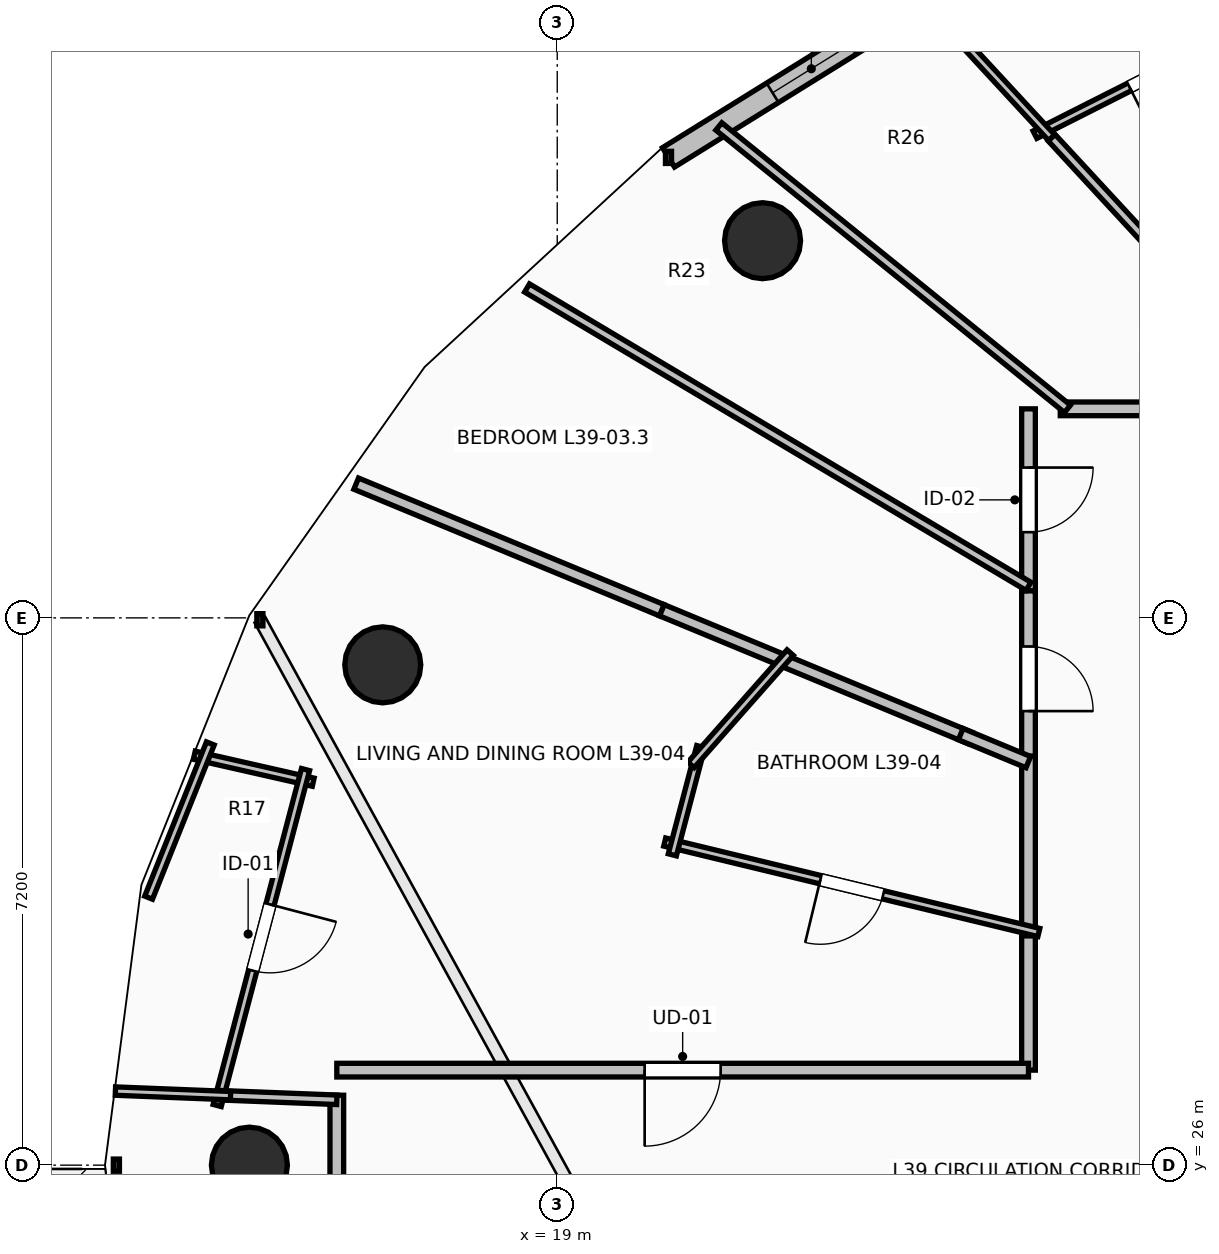
"""IFC4 building model, lengths in metres.
Left out: names, types, materials, properties, quantities, classifications, styles, units other than length and angle.
Written with IfcOpenShell. Run it as: python <this file> out.ifc"""

import sys

from ifc_helpers import new_model, si_unit, direction, frame, frame_2d, origin, origin_2d, place, context, subcontext, project, spatial, rectangle, circle, extrude, element, fill, save


model = new_model("IFC4")
c1 = context("Model", 3, precision=1e-05, world=origin(), true_north=direction((0.0, 1.0)))
c2 = subcontext(c1, "Body", "Model", "MODEL_VIEW")
j1 = project(units=[si_unit("LENGTHUNIT", "METRE"), si_unit("PLANEANGLEUNIT", "RADIAN")], contexts=[c1])
p1 = place(None, origin())
s1 = spatial("IfcSite", under=j1, at=p1, CompositionType="ELEMENT")
p2 = place(p1, origin())
s2 = spatial("IfcBuilding", under=s1, at=p2, CompositionType="ELEMENT")
p3 = place(p2, frame((0.0, 0.0, 146.6)))
s3 = spatial("IfcBuildingStorey", under=s2, at=p3, CompositionType="ELEMENT", Elevation=146.6)
for number, where, z_axis, x_axis in (
    (1, (21.701, 38.162, 0.0), (0.0, 0.0, 1.0), (-0.707, 0.707, 0.0)),
    (2, (16.705, 32.582, 0.0), (0.0, 0.0, 1.0), (-0.924, 0.383, 0.0)),
    (3, (14.95, 26.0, 0.0), (0.0, 0.0, 1.0), (-1.0, 0.0, 0.0)),
):
    element("IfcColumn", number, at=place(p3, frame(where, z_axis=z_axis, x_axis=x_axis)), inside=s3, PredefinedType="COLUMN", context=c2, shape_type="SweptSolid", body=[
        extrude(circle(Radius=0.5, at=origin_2d()), origin(), (0.0, 0.0, 1.0), 3.5),
    ])
p4 = place(p3, frame((24.222, 41.59, 0.0), z_axis=(0.0, 0.0, 1.0), x_axis=(-0.849721181976, -0.527232313977, 0.0)))
e4 = element("IfcWall", 4, at=p4, inside=s3, PredefinedType="STANDARD", context=c2, shape_type="SweptSolid", body=[
    extrude(rectangle(XDim=4.423, YDim=0.3, at=frame_2d((2.211, 0.0))), origin(), (0.0, 0.0, 1.0), 3.24),
])
p5 = place(p4, frame((1.611, 0.0, 0.85)))
e5 = element("IfcOpeningElement", 5, at=p5, cuts=e4, PredefinedType="OPENING", context=c2, shape_type="SweptSolid", body=[
    extrude(rectangle(XDim=1.2, YDim=1.95, at=frame_2d((0.6, 0.975))), frame((0.0, 0.165, 0.0), z_axis=(0.0, -1.0, 0.0), x_axis=(1.0, 0.0, 0.0)), (0.0, 0.0, 1.0), 0.33),
])
p6 = place(p3, frame((28.72, 35.95, 0.0), z_axis=(0.0, 0.0, 1.0), x_axis=(-1.0, 0.0, 0.0)))
e6 = element("IfcWall", 6, at=p6, inside=s3, PredefinedType="PARTITIONING", context=c2, shape_type="SweptSolid", body=[
    extrude(rectangle(XDim=3.102, YDim=0.18, at=frame_2d((1.551, 0.0))), origin(), (0.0, 0.0, 1.0), 2.432),
])
p7 = place(p3, frame((25.2, 35.95, 0.0), z_axis=(0.0, 0.0, 1.0), x_axis=(0.0, -1.0, 0.0)))
e7 = element("IfcWall", 7, at=p7, inside=s3, PredefinedType="PARTITIONING", context=c2, shape_type="SweptSolid", body=[
    extrude(rectangle(XDim=2.395, YDim=0.18, at=frame_2d((1.198, 0.0))), origin(), (0.0, 0.0, 1.0), 2.432),
])
p8 = place(p7, frame((0.772, 0.0, 0.0)))
e8 = element("IfcOpeningElement", 8, at=p8, cuts=e7, PredefinedType="OPENING", context=c2, shape_type="SweptSolid", body=[
    extrude(rectangle(XDim=0.85, YDim=2.1, at=frame_2d((0.425, 1.05))), frame((0.0, 0.105, 0.0), z_axis=(0.0, -1.0, 0.0), x_axis=(1.0, 0.0, 0.0)), (0.0, 0.0, 1.0), 0.21),
])
p9 = place(p3, frame((25.2, 33.555, 0.0), z_axis=(0.0, 0.0, 1.0), x_axis=(0.0, -1.0, 0.0)))
e9 = element("IfcWall", 9, at=p9, inside=s3, PredefinedType="PARTITIONING", context=c2, shape_type="SweptSolid", body=[
    extrude(rectangle(XDim=2.313, YDim=0.18, at=frame_2d((1.156, 0.0))), origin(), (0.0, 0.0, 1.0), 3.24),
])
p10 = place(p9, frame((0.731, 0.0, 0.0)))
e10 = element("IfcOpeningElement", 10, at=p10, cuts=e9, PredefinedType="OPENING", context=c2, shape_type="SweptSolid", body=[
    extrude(rectangle(XDim=0.85, YDim=2.1, at=frame_2d((0.425, 1.05))), frame((0.0, 0.105, 0.0), z_axis=(0.0, -1.0, 0.0), x_axis=(1.0, 0.0, 0.0)), (0.0, 0.0, 1.0), 0.21),
])
p11 = place(p3, frame((25.2, 29.156, 0.0), z_axis=(0.0, 0.0, 1.0), x_axis=(0.0, -1.0, 0.0)))
e11 = element("IfcWall", 11, at=p11, inside=s3, PredefinedType="PARTITIONING", context=c2, shape_type="SweptSolid", body=[
    extrude(rectangle(XDim=1.906, YDim=0.18, at=frame_2d((0.953, 0.0))), origin(), (0.0, 0.0, 1.0), 2.432),
])
p12 = place(p3, frame((25.2, 27.25, 0.0), z_axis=(0.0, 0.0, 1.0), x_axis=(-1.0, 0.0, 0.0)))
e12 = element("IfcWall", 12, at=p12, inside=s3, PredefinedType="PARTITIONING", context=c2, shape_type="SweptSolid", body=[
    extrude(rectangle(XDim=9.1, YDim=0.18, at=frame_2d((4.55, 0.0))), origin(), (0.0, 0.0, 1.0), 2.432),
])
p13 = place(p12, frame((4.05, 0.0, 0.0)))
e13 = element("IfcOpeningElement", 13, at=p13, cuts=e12, PredefinedType="OPENING", context=c2, shape_type="SweptSolid", body=[
    extrude(rectangle(XDim=1.0, YDim=2.15, at=frame_2d((0.5, 1.075))), frame((0.0, 0.105, 0.0), z_axis=(0.0, -1.0, 0.0), x_axis=(1.0, 0.0, 0.0)), (0.0, 0.0, 1.0), 0.21),
])
p14 = place(p3, frame((25.2, 31.382, 0.0), z_axis=(0.0, 0.0, 1.0), x_axis=(0.0, -1.0, 0.0)))
e14 = element("IfcWall", 14, at=p14, inside=s3, PredefinedType="PARTITIONING", context=c2, shape_type="SweptSolid", body=[
    extrude(rectangle(XDim=2.366, YDim=0.18, at=frame_2d((1.183, 0.0))), origin(), (0.0, 0.0, 1.0), 2.432),
])
p15 = place(p3, frame((16.1, 26.92, 0.0), z_axis=(0.0, 0.0, 1.0), x_axis=(0.0, -1.0, 0.0)))
e15 = element("IfcWall", 15, at=p15, inside=s3, PredefinedType="PARTITIONING", context=c2, shape_type="SweptSolid", body=[
    extrude(rectangle(XDim=2.37, YDim=0.18, at=frame_2d((1.185, 0.0))), origin(), (0.0, 0.0, 1.0), 2.432),
])
p16 = place(p3, frame((28.574, 41.219, 0.0), z_axis=(0.0, 0.0, 1.0), x_axis=(-0.892470920122, -0.451104928744, 0.0)))
e16 = element("IfcWall", 16, at=p16, inside=s3, PredefinedType="PARTITIONING", context=c2, shape_type="SweptSolid", body=[
    extrude(rectangle(XDim=3.685, YDim=0.11, at=frame_2d((1.843, 0.0))), origin(), (0.0, 0.0, 1.0), 3.24),
])
p17 = place(p16, frame((1.393, 0.0, 0.0)))
e17 = element("IfcOpeningElement", 17, at=p17, cuts=e16, PredefinedType="OPENING", context=c2, shape_type="SweptSolid", body=[
    extrude(rectangle(XDim=0.9, YDim=2.1, at=frame_2d((0.45, 1.05))), frame((0.0, 0.07, 0.0), z_axis=(0.0, -1.0, 0.0), x_axis=(1.0, 0.0, 0.0)), (0.0, 0.0, 1.0), 0.14),
])
p18 = place(p3, frame((25.505, 39.517, 0.0), z_axis=(0.0, 0.0, 1.0), x_axis=(-0.678720806978, 0.734396395808, 0.0)))
e18 = element("IfcWall", 18, at=p18, inside=s3, PredefinedType="PARTITIONING", context=c2, shape_type="SweptSolid", body=[
    extrude(rectangle(XDim=2.622, YDim=0.11, at=frame_2d((1.311, 0.0))), origin(), (0.0, 0.0, 1.0), 2.728),
])
p19 = place(p3, frame((25.505, 39.517, 0.0), z_axis=(0.0, 0.0, 1.0), x_axis=(0.678766339668, -0.734354312395, 0.0)))
e19 = element("IfcWall", 19, at=p19, inside=s3, PredefinedType="PARTITIONING", context=c2, shape_type="SweptSolid", body=[
    extrude(rectangle(XDim=4.857, YDim=0.125, at=frame_2d((2.429, 0.0))), origin(), (0.0, 0.0, 1.0), 2.432),
])
p20 = place(p19, frame((1.979, 0.0, 0.0)))
e20 = element("IfcOpeningElement", 20, at=p20, cuts=e19, PredefinedType="OPENING", context=c2, shape_type="SweptSolid", body=[
    extrude(rectangle(XDim=0.9, YDim=2.1, at=frame_2d((0.45, 1.05))), frame((0.0, 0.077, 0.0), z_axis=(0.0, -1.0, 0.0), x_axis=(1.0, 0.0, 0.0)), (0.0, 0.0, 1.0), 0.155),
])
p21 = place(p3, frame((21.126, 39.665, 0.0), z_axis=(0.0, 0.0, 1.0), x_axis=(0.777089771819, -0.629389773141, 0.0)))
e21 = element("IfcWall", 21, at=p21, inside=s3, PredefinedType="PARTITIONING", context=c2, shape_type="SweptSolid", body=[
    extrude(rectangle(XDim=5.903, YDim=0.125, at=frame_2d((2.951, 0.0))), origin(), (0.0, 0.0, 1.0), 2.728),
])
p22 = place(p3, frame((18.603, 37.54, 0.0), z_axis=(0.0, 0.0, 1.0), x_axis=(0.859389720334, -0.511321140365, 0.0)))
e22 = element("IfcWall", 22, at=p22, inside=s3, PredefinedType="PARTITIONING", context=c2, shape_type="SweptSolid", body=[
    extrude(rectangle(XDim=7.676, YDim=0.125, at=frame_2d((3.838, 0.0))), origin(), (0.0, 0.0, 1.0), 2.728),
])
p23 = place(p3, frame((16.355, 34.966, 0.0), z_axis=(0.0, 0.0, 1.0), x_axis=(0.923874659351, -0.382695197002, 0.0)))
e23 = element("IfcWall", 23, at=p23, inside=s3, PredefinedType="PARTITIONING", context=c2, shape_type="SweptSolid", body=[
    extrude(rectangle(XDim=4.353, YDim=0.16, at=frame_2d((2.177, 0.0))), origin(), (0.0, 0.0, 1.0), 2.728),
])
p24 = place(p3, frame((20.377, 33.3, 0.0), z_axis=(0.0, 0.0, 1.0), x_axis=(0.923801529802, -0.382871693306, 0.0)))
e24 = element("IfcWall", 24, at=p24, inside=s3, PredefinedType="PARTITIONING", context=c2, shape_type="SweptSolid", body=[
    extrude(rectangle(XDim=4.396, YDim=0.16, at=frame_2d((2.198, 0.0))), origin(), (0.0, 0.0, 1.0), 2.922),
])
p25 = place(p3, frame((24.309, 31.671, 0.0), z_axis=(0.0, 0.0, 1.0), x_axis=(0.923855963606, -0.38274032778, 0.0)))
e25 = element("IfcWall", 25, at=p25, inside=s3, PredefinedType="PARTITIONING", context=c2, shape_type="SweptSolid", body=[
    extrude(rectangle(XDim=0.962, YDim=0.16, at=frame_2d((0.481, 0.0))), origin(), (0.0, 0.0, 1.0), 2.972),
])
p26 = place(p3, frame((25.336, 29.061, 0.0), z_axis=(0.0, 0.0, 1.0), x_axis=(-0.972001766098, 0.234973544686, 0.0)))
e26 = element("IfcWall", 26, at=p26, inside=s3, PredefinedType="PARTITIONING", context=c2, shape_type="SweptSolid", body=[
    extrude(rectangle(XDim=5.064, YDim=0.11, at=frame_2d((2.532, 0.0))), origin(), (0.0, 0.0, 1.0), 2.432),
])
p27 = place(p26, frame((2.107, 0.0, 0.0)))
e27 = element("IfcOpeningElement", 27, at=p27, cuts=e26, PredefinedType="OPENING", context=c2, shape_type="SweptSolid", body=[
    extrude(rectangle(XDim=0.85, YDim=2.1, at=frame_2d((0.425, 1.05))), frame((0.0, 0.07, 0.0), z_axis=(0.0, -1.0, 0.0), x_axis=(1.0, 0.0, 0.0)), (0.0, 0.0, 1.0), 0.14),
])
p28 = place(p3, frame((20.514, 30.083, 0.0), z_axis=(0.0, 0.0, 1.0), x_axis=(0.254223916145, 0.967145387447, 0.0)))
e28 = element("IfcWall", 28, at=p28, inside=s3, PredefinedType="PARTITIONING", context=c2, shape_type="SweptSolid", body=[
    extrude(rectangle(XDim=1.472, YDim=0.11, at=frame_2d((0.736, 0.0))), origin(), (0.0, 0.0, 1.0), 2.432),
])
p29 = place(p3, frame((20.76, 31.266, 0.0), z_axis=(0.0, 0.0, 1.0), x_axis=(0.662014950831, 0.749490630279, 0.0)))
e29 = element("IfcWall", 29, at=p29, inside=s3, PredefinedType="PARTITIONING", context=c2, shape_type="SweptSolid", body=[
    extrude(rectangle(XDim=1.97, YDim=0.11, at=frame_2d((0.985, 0.0))), origin(), (0.0, 0.0, 1.0), 2.922),
])
p30 = place(p3, frame((14.226, 31.393, 0.0), z_axis=(0.0, 0.0, 1.0), x_axis=(0.975195623383, -0.221344744989, 0.0)))
e30 = element("IfcWall", 30, at=p30, inside=s3, PredefinedType="PARTITIONING", context=c2, shape_type="SweptSolid", body=[
    extrude(rectangle(XDim=1.604, YDim=0.11, at=frame_2d((0.802, 0.0))), origin(), (0.0, 0.0, 1.0), 3.24),
])
p31 = place(p3, frame((15.689, 31.204, 0.0), z_axis=(0.0, 0.0, 1.0), x_axis=(-0.254346037576, -0.967113278354, 0.0)))
e31 = element("IfcWall", 31, at=p31, inside=s3, PredefinedType="PARTITIONING", context=c2, shape_type="SweptSolid", body=[
    extrude(rectangle(XDim=4.57, YDim=0.11, at=frame_2d((2.285, 0.0))), origin(), (0.0, 0.0, 1.0), 3.24),
])
p32 = place(p31, frame((1.835, 0.0, 0.0)))
e32 = element("IfcOpeningElement", 32, at=p32, cuts=e31, PredefinedType="OPENING", context=c2, shape_type="SweptSolid", body=[
    extrude(rectangle(XDim=0.9, YDim=2.1, at=frame_2d((0.45, 1.05))), frame((0.0, 0.07, 0.0), z_axis=(0.0, -1.0, 0.0), x_axis=(1.0, 0.0, 0.0)), (0.0, 0.0, 1.0), 0.14),
])
p33 = place(p3, frame((14.436, 31.548, 0.0), z_axis=(0.0, 0.0, 1.0), x_axis=(-0.371544752876, -0.928415045446, 0.0)))
e33 = element("IfcWall", 33, at=p33, inside=s3, PredefinedType="PARTITIONING", context=c2, shape_type="SweptSolid", body=[
    extrude(rectangle(XDim=2.186, YDim=0.11, at=frame_2d((1.093, 0.0))), origin(), (0.0, 0.0, 1.0), 3.24),
])
p34 = place(p3, frame((14.562, 26.92, 0.0), z_axis=(0.0, 0.0, 1.0), x_axis=(0.999244683777, -0.03885951548, 0.0)))
e34 = element("IfcWall", 34, at=p34, inside=s3, PredefinedType="PARTITIONING", context=c2, shape_type="SweptSolid", body=[
    extrude(rectangle(XDim=1.539, YDim=0.125, at=frame_2d((0.77, 0.0))), origin(), (0.0, 0.0, 1.0), 2.728),
])
p35 = place(p3, frame((13.187, 26.975, 0.0), z_axis=(0.0, 0.0, 1.0), x_axis=(0.999208657324, -0.039775106907, 0.0)))
e35 = element("IfcWall", 35, at=p35, inside=s3, PredefinedType="PARTITIONING", context=c2, shape_type="SweptSolid", body=[
    extrude(rectangle(XDim=1.516, YDim=0.11, at=frame_2d((0.758, 0.0))), origin(), (0.0, 0.0, 1.0), 3.24),
])
p36 = place(p5, origin())
e36 = element("IfcWindow", 36, at=p36, inside=s3, PartitioningType="SINGLE_PANEL", PredefinedType="WINDOW", context=c2, shape_type="SweptSolid", body=[
    extrude(rectangle(XDim=1.2, YDim=1.95, at=frame_2d((0.6, 0.975))), frame((0.0, 0.03, 0.0), z_axis=(0.0, -1.0, 0.0), x_axis=(1.0, 0.0, 0.0)), (0.0, 0.0, 1.0), 0.06),
])
fill(e5, e36)
p37 = place(p13, origin())
e37 = element("IfcDoor", 37, at=p37, inside=s3, OperationType="SINGLE_SWING_RIGHT", PredefinedType="DOOR", context=c2, shape_type="SweptSolid", body=[
    extrude(rectangle(XDim=1.0, YDim=2.15, at=frame_2d((0.5, 1.075))), frame((0.0, 0.025, 0.0), z_axis=(0.0, -1.0, 0.0), x_axis=(1.0, 0.0, 0.0)), (0.0, 0.0, 1.0), 0.05),
])
fill(e13, e37)
p38 = place(p17, origin())
e38 = element("IfcDoor", 38, at=p38, inside=s3, OperationType="SINGLE_SWING_RIGHT", PredefinedType="DOOR", context=c2, shape_type="SweptSolid", body=[
    extrude(rectangle(XDim=0.9, YDim=2.1, at=frame_2d((0.45, 1.05))), frame((0.0, 0.025, 0.0), z_axis=(0.0, -1.0, 0.0), x_axis=(1.0, 0.0, 0.0)), (0.0, 0.0, 1.0), 0.05),
])
fill(e17, e38)
p39 = place(p27, origin())
e39 = element("IfcDoor", 39, at=p39, inside=s3, OperationType="SINGLE_SWING_RIGHT", PredefinedType="DOOR", context=c2, shape_type="SweptSolid", body=[
    extrude(rectangle(XDim=0.85, YDim=2.1, at=frame_2d((0.425, 1.05))), frame((0.0, 0.025, 0.0), z_axis=(0.0, -1.0, 0.0), x_axis=(1.0, 0.0, 0.0)), (0.0, 0.0, 1.0), 0.05),
])
fill(e27, e39)
p40 = place(p32, origin())
e40 = element("IfcDoor", 40, at=p40, inside=s3, OperationType="SINGLE_SWING_LEFT", PredefinedType="DOOR", context=c2, shape_type="SweptSolid", body=[
    extrude(rectangle(XDim=0.9, YDim=2.1, at=frame_2d((0.45, 1.05))), frame((0.0, 0.025, 0.0), z_axis=(0.0, -1.0, 0.0), x_axis=(1.0, 0.0, 0.0)), (0.0, 0.0, 1.0), 0.05),
])
fill(e32, e40)
p41 = place(p8, origin())
e41 = element("IfcDoor", 41, at=p41, inside=s3, OperationType="SINGLE_SWING_LEFT", PredefinedType="DOOR", context=c2, shape_type="SweptSolid", body=[
    extrude(rectangle(XDim=0.85, YDim=2.1, at=frame_2d((0.425, 1.05))), frame((0.0, 0.025, 0.0), z_axis=(0.0, -1.0, 0.0), x_axis=(1.0, 0.0, 0.0)), (0.0, 0.0, 1.0), 0.05),
])
fill(e8, e41)
p42 = place(p10, origin())
e42 = element("IfcDoor", 42, at=p42, inside=s3, OperationType="SINGLE_SWING_RIGHT", PredefinedType="DOOR", context=c2, shape_type="SweptSolid", body=[
    extrude(rectangle(XDim=0.85, YDim=2.1, at=frame_2d((0.425, 1.05))), frame((0.0, 0.025, 0.0), z_axis=(0.0, -1.0, 0.0), x_axis=(1.0, 0.0, 0.0)), (0.0, 0.0, 1.0), 0.05),
])
fill(e10, e42)
save(model, sys.argv[1])
